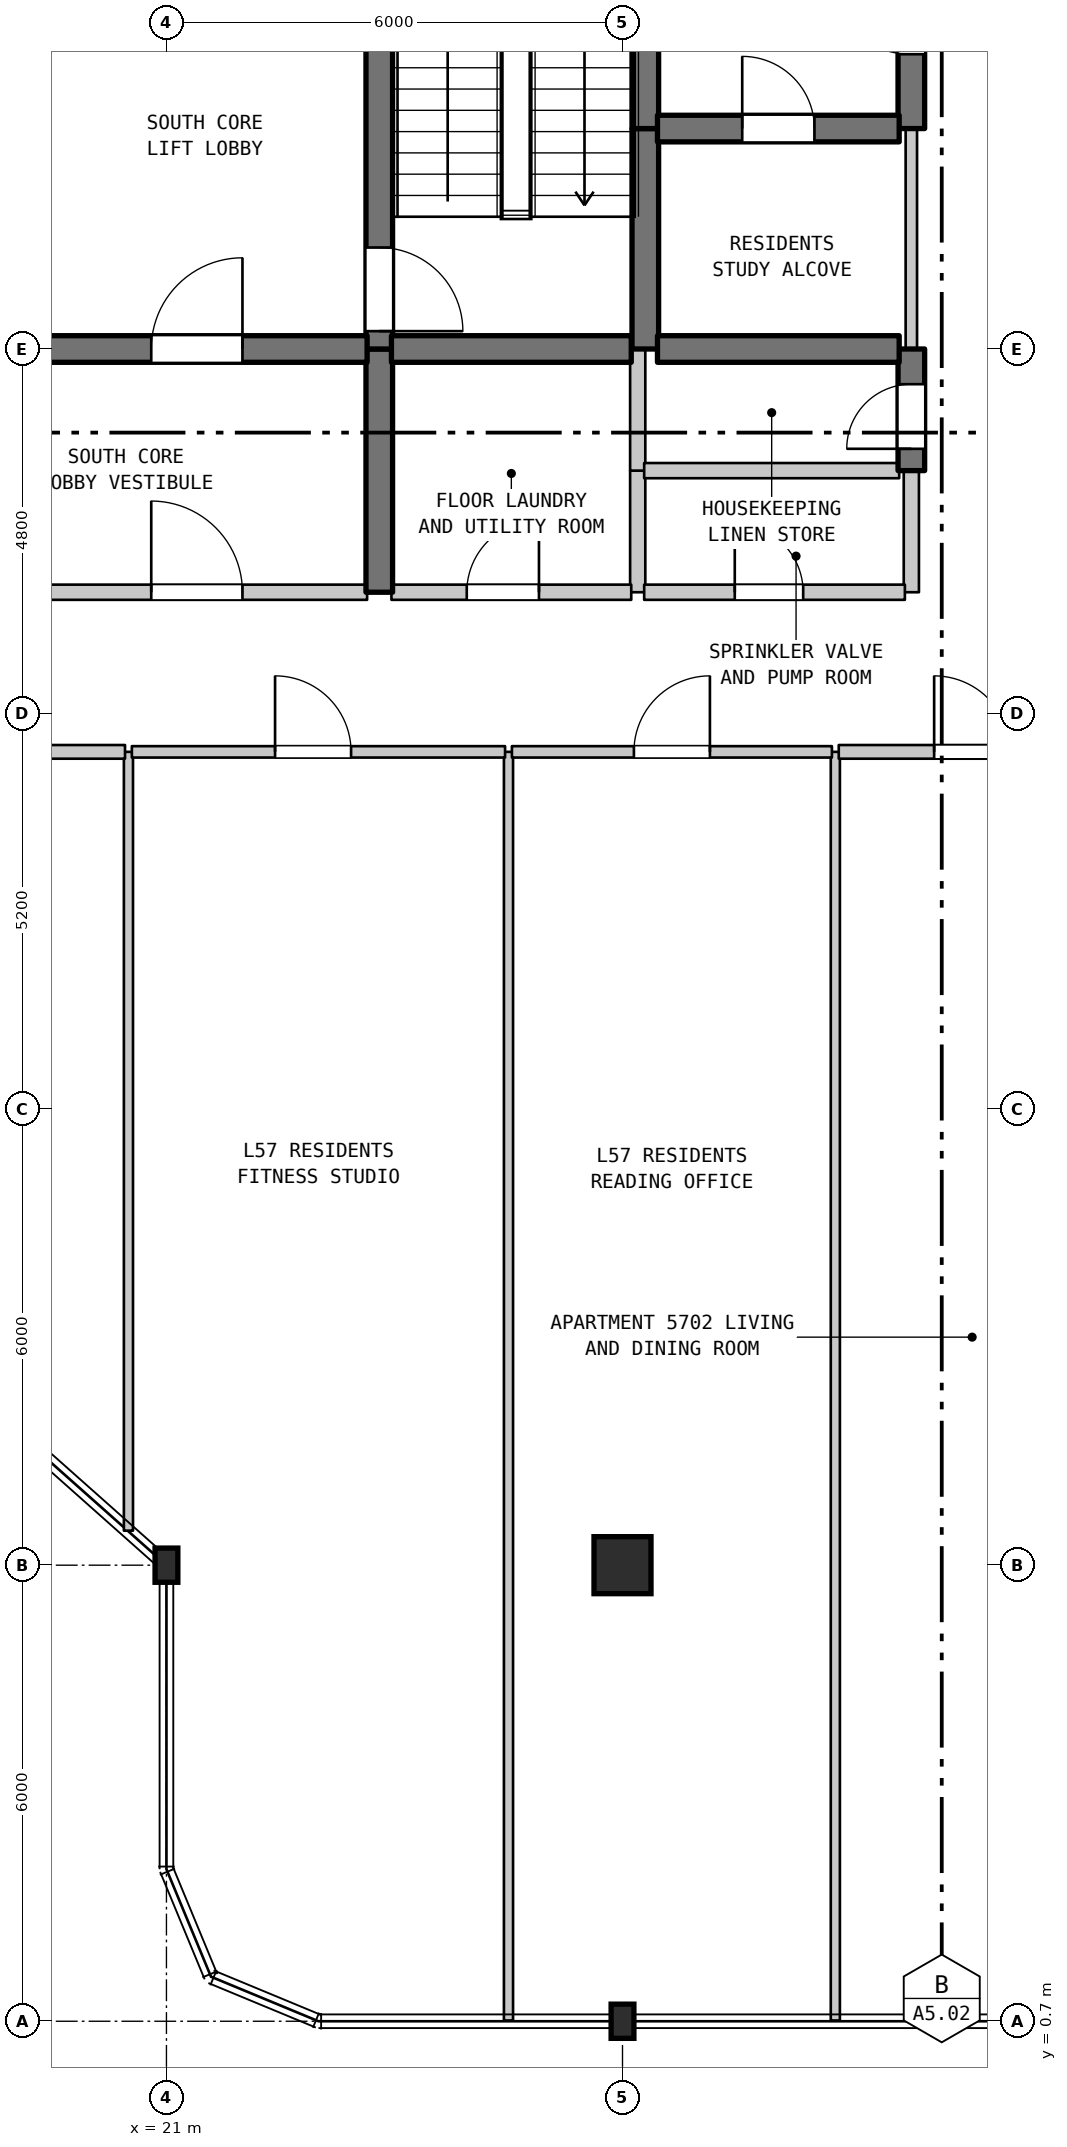
"""IFC4 building model, lengths in metres.
Left out: names, types, materials, properties, quantities, classifications, styles, units other than length and angle.
Written with IfcOpenShell. Run it as: python <this file> out.ifc"""

import sys

from ifc_helpers import new_model, si_unit, direction, frame, frame_2d, origin, origin_2d, place, context, subcontext, project, spatial, rectangle, i_section, extrude, element, fill, save


model = new_model("IFC4")
c1 = context("Model", 3, precision=1e-05, world=origin(), true_north=direction((0.0, 1.0)))
c2 = subcontext(c1, "Body", "Model", "MODEL_VIEW")
j1 = project(units=[si_unit("LENGTHUNIT", "METRE"), si_unit("PLANEANGLEUNIT", "RADIAN")], contexts=[c1])
p1 = place(None, origin())
s1 = spatial("IfcSite", under=j1, at=p1, CompositionType="ELEMENT")
p2 = place(p1, origin())
s2 = spatial("IfcBuilding", under=s1, at=p2, CompositionType="ELEMENT")
p3 = place(p2, frame((0.0, 0.0, 230.2)))
s3 = spatial("IfcBuildingStorey", under=s2, at=p3, CompositionType="ELEMENT", Elevation=230.2)
for number, where, z_axis, x_axis in (
    (1, (21.0, 6.7, 0.0), (0.0, 0.0, 1.0), (1.0, 0.0, 0.0)),
    (2, (27.0, 0.7, 0.0), (0.0, 0.0, 1.0), (1.0, 0.0, 0.0)),
):
    element("IfcColumn", number, at=place(p3, frame(where, z_axis=z_axis, x_axis=x_axis)), inside=s3, PredefinedType="COLUMN", context=c2, shape_type="SweptSolid", body=[
        extrude(i_section(OverallWidth=0.3, OverallDepth=0.45, WebThickness=0.014, FlangeThickness=0.026, FilletRadius=0.027, at=origin_2d()), origin(), (0.0, 0.0, 1.0), 3.7),
    ])
p4 = place(p3, frame((27.0, 6.7, 0.0), z_axis=(0.0, 0.0, 1.0), x_axis=(1.0, 0.0, 0.0)))
e3 = element("IfcColumn", 3, at=p4, inside=s3, PredefinedType="COLUMN", context=c2, shape_type="SweptSolid", body=[
    extrude(rectangle(XDim=0.75, YDim=0.75, at=origin_2d()), origin(), (0.0, 0.0, 1.0), 3.7),
])
p5 = place(p3, frame((20.5, 7.154, 0.0), z_axis=(0.0, 0.0, 1.0), x_axis=(0.0, 1.0, 0.0)))
e4 = element("IfcWall", 4, at=p5, inside=s3, PredefinedType="PARTITIONING", context=c2, shape_type="SweptSolid", body=[
    extrude(rectangle(XDim=10.246, YDim=0.12, at=frame_2d((5.123, 0.0))), origin(), (0.0, 0.0, 1.0), 3.39),
])
p6 = place(p3, frame((23.8, 19.5, 0.0), z_axis=(0.0, 0.0, 1.0), x_axis=(0.0, 1.0, 0.0)))
e5 = element("IfcWall", 5, at=p6, inside=s3, PredefinedType="SHEAR", context=c2, shape_type="SweptSolid", body=[
    extrude(rectangle(XDim=3.2, YDim=0.35, at=frame_2d((1.6, 0.0))), origin(), (0.0, 0.0, 1.0), 3.39),
])
p7 = place(p3, frame((23.8, 22.7, 0.0), z_axis=(0.0, 0.0, 1.0), x_axis=(0.0, 1.0, 0.0)))
e6 = element("IfcWall", 6, at=p7, inside=s3, PredefinedType="SHEAR", context=c2, shape_type="SweptSolid", body=[
    extrude(rectangle(XDim=5.5, YDim=0.35, at=frame_2d((2.75, 0.0))), origin(), (0.0, 0.0, 1.0), 3.39),
])
p8 = place(p7, frame((0.235, 0.0, 0.0)))
e7 = element("IfcOpeningElement", 7, at=p8, cuts=e6, PredefinedType="OPENING", context=c2, shape_type="SweptSolid", body=[
    extrude(rectangle(XDim=1.1, YDim=2.15, at=frame_2d((0.55, 1.075))), frame((0.0, 0.185, 0.0), z_axis=(0.0, -1.0, 0.0), x_axis=(1.0, 0.0, 0.0)), (0.0, 0.0, 1.0), 0.37),
])
p9 = place(p3, frame((25.5, 0.71, 0.0), z_axis=(0.0, 0.0, 1.0), x_axis=(0.0, 1.0, 0.0)))
e8 = element("IfcWall", 8, at=p9, inside=s3, PredefinedType="PARTITIONING", context=c2, shape_type="SweptSolid", body=[
    extrude(rectangle(XDim=16.69, YDim=0.12, at=frame_2d((8.345, 0.0))), origin(), (0.0, 0.0, 1.0), 3.39),
])
p10 = place(p3, frame((27.2, 19.5, 0.0), z_axis=(0.0, 0.0, 1.0), x_axis=(0.0, 1.0, 0.0)))
e9 = element("IfcWall", 9, at=p10, inside=s3, PredefinedType="STANDARD", context=c2, shape_type="SweptSolid", body=[
    extrude(rectangle(XDim=1.6, YDim=0.2, at=frame_2d((0.8, 0.0))), origin(), (0.0, 0.0, 1.0), 3.39),
])
p11 = place(p3, frame((27.2, 21.1, 0.0), z_axis=(0.0, 0.0, 1.0), x_axis=(0.0, 1.0, 0.0)))
e10 = element("IfcWall", 10, at=p11, inside=s3, PredefinedType="STANDARD", context=c2, shape_type="SweptSolid", body=[
    extrude(rectangle(XDim=1.6, YDim=0.2, at=frame_2d((0.8, 0.0))), origin(), (0.0, 0.0, 1.0), 3.39),
])
p12 = place(p3, frame((27.3, 22.7, 0.0), z_axis=(0.0, 0.0, 1.0), x_axis=(0.0, 1.0, 0.0)))
e11 = element("IfcWall", 11, at=p12, inside=s3, PredefinedType="SHEAR", context=c2, shape_type="SweptSolid", body=[
    extrude(rectangle(XDim=2.9, YDim=0.35, at=frame_2d((1.45, 0.0))), origin(), (0.0, 0.0, 1.0), 3.39),
])
p13 = place(p3, frame((27.3, 25.6, 0.0), z_axis=(0.0, 0.0, 1.0), x_axis=(0.0, 1.0, 0.0)))
e12 = element("IfcWall", 12, at=p13, inside=s3, PredefinedType="SHEAR", context=c2, shape_type="SweptSolid", body=[
    extrude(rectangle(XDim=3.3, YDim=0.35, at=frame_2d((1.65, 0.0))), origin(), (0.0, 0.0, 1.0), 3.39),
])
p14 = place(p3, frame((29.8, 0.71, 0.0), z_axis=(0.0, 0.0, 1.0), x_axis=(0.0, 1.0, 0.0)))
e13 = element("IfcWall", 13, at=p14, inside=s3, PredefinedType="PARTITIONING", context=c2, shape_type="SweptSolid", body=[
    extrude(rectangle(XDim=16.69, YDim=0.12, at=frame_2d((8.345, 0.0))), origin(), (0.0, 0.0, 1.0), 3.39),
])
p15 = place(p3, frame((30.8, 19.5, 0.0), z_axis=(0.0, 0.0, 1.0), x_axis=(0.0, 1.0, 0.0)))
e14 = element("IfcWall", 14, at=p15, inside=s3, PredefinedType="STANDARD", context=c2, shape_type="SweptSolid", body=[
    extrude(rectangle(XDim=1.6, YDim=0.2, at=frame_2d((0.8, 0.0))), origin(), (0.0, 0.0, 1.0), 3.39),
])
p16 = place(p3, frame((30.8, 21.1, 0.0), z_axis=(0.0, 0.0, 1.0), x_axis=(0.0, 1.0, 0.0)))
e15 = element("IfcWall", 15, at=p16, inside=s3, PredefinedType="SHEAR", context=c2, shape_type="SweptSolid", body=[
    extrude(rectangle(XDim=1.6, YDim=0.35, at=frame_2d((0.8, 0.0))), origin(), (0.0, 0.0, 1.0), 3.39),
])
p17 = place(p16, frame((0.287, 0.0, 0.0)))
e16 = element("IfcOpeningElement", 16, at=p17, cuts=e15, PredefinedType="OPENING", context=c2, shape_type="SweptSolid", body=[
    extrude(rectangle(XDim=0.85, YDim=2.1, at=frame_2d((0.425, 1.05))), frame((0.0, 0.185, 0.0), z_axis=(0.0, -1.0, 0.0), x_axis=(1.0, 0.0, 0.0)), (0.0, 0.0, 1.0), 0.37),
])
p18 = place(p3, frame((30.8, 22.7, 0.0), z_axis=(0.0, 0.0, 1.0), x_axis=(0.0, 1.0, 0.0)))
e17 = element("IfcWall", 17, at=p18, inside=s3, PredefinedType="STANDARD", context=c2, shape_type="SweptSolid", body=[
    extrude(rectangle(XDim=2.9, YDim=0.15, at=frame_2d((1.45, 0.0))), origin(), (0.0, 0.0, 1.0), 3.39),
])
p19 = place(p3, frame((30.8, 25.6, 0.0), z_axis=(0.0, 0.0, 1.0), x_axis=(0.0, 1.0, 0.0)))
e18 = element("IfcWall", 18, at=p19, inside=s3, PredefinedType="SHEAR", context=c2, shape_type="SweptSolid", body=[
    extrude(rectangle(XDim=3.3, YDim=0.35, at=frame_2d((1.65, 0.0))), origin(), (0.0, 0.0, 1.0), 3.39),
])
p20 = place(p19, frame((0.978, 0.0, 0.0)))
e19 = element("IfcOpeningElement", 19, at=p20, cuts=e18, PredefinedType="OPENING", context=c2, shape_type="SweptSolid", body=[
    extrude(rectangle(XDim=1.2, YDim=2.2, at=frame_2d((0.6, 1.1))), frame((0.0, 0.185, 0.0), z_axis=(0.0, -1.0, 0.0), x_axis=(1.0, 0.0, 0.0)), (0.0, 0.0, 1.0), 0.37),
])
p21 = place(p3, frame((18.595, 17.4, 0.0), z_axis=(0.0, 0.0, 1.0), x_axis=(1.0, 0.0, 0.0)))
e20 = element("IfcWall", 20, at=p21, inside=s3, PredefinedType="STANDARD", context=c2, shape_type="SweptSolid", body=[
    extrude(rectangle(XDim=1.86, YDim=0.18, at=frame_2d((0.93, 0.0))), origin(), (0.0, 0.0, 1.0), 3.39),
])
p22 = place(p3, frame((20.545, 17.4, 0.0), z_axis=(0.0, 0.0, 1.0), x_axis=(1.0, 0.0, 0.0)))
e21 = element("IfcWall", 21, at=p22, inside=s3, PredefinedType="STANDARD", context=c2, shape_type="SweptSolid", body=[
    extrude(rectangle(XDim=4.91, YDim=0.15, at=frame_2d((2.455, 0.0))), origin(), (0.0, 0.0, 1.0), 3.39),
])
p23 = place(p22, frame((1.884, 0.0, 0.0)))
e22 = element("IfcOpeningElement", 22, at=p23, cuts=e21, PredefinedType="OPENING", context=c2, shape_type="SweptSolid", body=[
    extrude(rectangle(XDim=1.0, YDim=2.15, at=frame_2d((0.5, 1.075))), frame((0.0, 0.085, 0.0), z_axis=(0.0, -1.0, 0.0), x_axis=(1.0, 0.0, 0.0)), (0.0, 0.0, 1.0), 0.17),
])
p24 = place(p3, frame((25.545, 17.4, 0.0), z_axis=(0.0, 0.0, 1.0), x_axis=(1.0, 0.0, 0.0)))
e23 = element("IfcWall", 23, at=p24, inside=s3, PredefinedType="STANDARD", context=c2, shape_type="SweptSolid", body=[
    extrude(rectangle(XDim=4.21, YDim=0.15, at=frame_2d((2.105, 0.0))), origin(), (0.0, 0.0, 1.0), 3.39),
])
p25 = place(p24, frame((1.605, 0.0, 0.0)))
e24 = element("IfcOpeningElement", 24, at=p25, cuts=e23, PredefinedType="OPENING", context=c2, shape_type="SweptSolid", body=[
    extrude(rectangle(XDim=1.0, YDim=2.15, at=frame_2d((0.5, 1.075))), frame((0.0, 0.085, 0.0), z_axis=(0.0, -1.0, 0.0), x_axis=(1.0, 0.0, 0.0)), (0.0, 0.0, 1.0), 0.17),
])
p26 = place(p3, frame((29.845, 17.4, 0.0), z_axis=(0.0, 0.0, 1.0), x_axis=(1.0, 0.0, 0.0)))
e25 = element("IfcWall", 25, at=p26, inside=s3, PredefinedType="STANDARD", context=c2, shape_type="SweptSolid", body=[
    extrude(rectangle(XDim=3.51, YDim=0.18, at=frame_2d((1.755, 0.0))), origin(), (0.0, 0.0, 1.0), 3.39),
])
p27 = place(p26, frame((1.255, 0.0, 0.0)))
e26 = element("IfcOpeningElement", 26, at=p27, cuts=e25, PredefinedType="OPENING", context=c2, shape_type="SweptSolid", body=[
    extrude(rectangle(XDim=1.0, YDim=2.15, at=frame_2d((0.5, 1.075))), frame((0.0, 0.1, 0.0), z_axis=(0.0, -1.0, 0.0), x_axis=(1.0, 0.0, 0.0)), (0.0, 0.0, 1.0), 0.2),
])
p28 = place(p3, frame((19.16, 19.5, 0.0), z_axis=(0.0, 0.0, 1.0), x_axis=(1.0, 0.0, 0.0)))
e27 = element("IfcWall", 27, at=p28, inside=s3, PredefinedType="STANDARD", context=c2, shape_type="SweptSolid", body=[
    extrude(rectangle(XDim=4.48, YDim=0.2, at=frame_2d((2.24, 0.0))), origin(), (0.0, 0.0, 1.0), 3.39),
])
p29 = place(p28, frame((1.64, 0.0, 0.0)))
e28 = element("IfcOpeningElement", 28, at=p29, cuts=e27, PredefinedType="OPENING", context=c2, shape_type="SweptSolid", body=[
    extrude(rectangle(XDim=1.2, YDim=2.2, at=frame_2d((0.6, 1.1))), frame((0.0, 0.11, 0.0), z_axis=(0.0, -1.0, 0.0), x_axis=(1.0, 0.0, 0.0)), (0.0, 0.0, 1.0), 0.22),
])
p30 = place(p3, frame((23.96, 19.5, 0.0), z_axis=(0.0, 0.0, 1.0), x_axis=(1.0, 0.0, 0.0)))
e29 = element("IfcWall", 29, at=p30, inside=s3, PredefinedType="STANDARD", context=c2, shape_type="SweptSolid", body=[
    extrude(rectangle(XDim=3.155, YDim=0.2, at=frame_2d((1.578, 0.0))), origin(), (0.0, 0.0, 1.0), 3.39),
])
p31 = place(p30, frame((0.991, 0.0, 0.0)))
e30 = element("IfcOpeningElement", 30, at=p31, cuts=e29, PredefinedType="OPENING", context=c2, shape_type="SweptSolid", body=[
    extrude(rectangle(XDim=0.95, YDim=2.15, at=frame_2d((0.475, 1.075))), frame((0.0, 0.11, 0.0), z_axis=(0.0, -1.0, 0.0), x_axis=(1.0, 0.0, 0.0)), (0.0, 0.0, 1.0), 0.22),
])
p32 = place(p3, frame((27.285, 19.5, 0.0), z_axis=(0.0, 0.0, 1.0), x_axis=(1.0, 0.0, 0.0)))
e31 = element("IfcWall", 31, at=p32, inside=s3, PredefinedType="STANDARD", context=c2, shape_type="SweptSolid", body=[
    extrude(rectangle(XDim=3.43, YDim=0.2, at=frame_2d((1.715, 0.0))), origin(), (0.0, 0.0, 1.0), 3.39),
])
p33 = place(p32, frame((1.192, 0.0, 0.0)))
e32 = element("IfcOpeningElement", 32, at=p33, cuts=e31, PredefinedType="OPENING", context=c2, shape_type="SweptSolid", body=[
    extrude(rectangle(XDim=0.9, YDim=2.15, at=frame_2d((0.45, 1.075))), frame((0.0, 0.11, 0.0), z_axis=(0.0, -1.0, 0.0), x_axis=(1.0, 0.0, 0.0)), (0.0, 0.0, 1.0), 0.22),
])
p34 = place(p3, frame((27.285, 21.1, 0.0), z_axis=(0.0, 0.0, 1.0), x_axis=(1.0, 0.0, 0.0)))
e33 = element("IfcWall", 33, at=p34, inside=s3, PredefinedType="STANDARD", context=c2, shape_type="SweptSolid", body=[
    extrude(rectangle(XDim=3.355, YDim=0.2, at=frame_2d((1.677, 0.0))), origin(), (0.0, 0.0, 1.0), 3.39),
])
p35 = place(p3, frame((19.16, 22.7, 0.0), z_axis=(0.0, 0.0, 1.0), x_axis=(1.0, 0.0, 0.0)))
e34 = element("IfcWall", 34, at=p35, inside=s3, PredefinedType="SHEAR", context=c2, shape_type="SweptSolid", body=[
    extrude(rectangle(XDim=4.48, YDim=0.35, at=frame_2d((2.24, 0.0))), origin(), (0.0, 0.0, 1.0), 3.39),
])
p36 = place(p35, frame((1.64, 0.0, 0.0)))
e35 = element("IfcOpeningElement", 35, at=p36, cuts=e34, PredefinedType="OPENING", context=c2, shape_type="SweptSolid", body=[
    extrude(rectangle(XDim=1.2, YDim=2.2, at=frame_2d((0.6, 1.1))), frame((0.0, 0.185, 0.0), z_axis=(0.0, -1.0, 0.0), x_axis=(1.0, 0.0, 0.0)), (0.0, 0.0, 1.0), 0.37),
])
p37 = place(p3, frame((23.96, 22.7, 0.0), z_axis=(0.0, 0.0, 1.0), x_axis=(1.0, 0.0, 0.0)))
e36 = element("IfcWall", 36, at=p37, inside=s3, PredefinedType="SHEAR", context=c2, shape_type="SweptSolid", body=[
    extrude(rectangle(XDim=3.155, YDim=0.35, at=frame_2d((1.578, 0.0))), origin(), (0.0, 0.0, 1.0), 3.39),
])
p38 = place(p3, frame((27.46, 22.7, 0.0), z_axis=(0.0, 0.0, 1.0), x_axis=(1.0, 0.0, 0.0)))
e37 = element("IfcWall", 37, at=p38, inside=s3, PredefinedType="SHEAR", context=c2, shape_type="SweptSolid", body=[
    extrude(rectangle(XDim=3.18, YDim=0.35, at=frame_2d((1.59, 0.0))), origin(), (0.0, 0.0, 1.0), 3.39),
])
p39 = place(p3, frame((27.46, 25.6, 0.0), z_axis=(0.0, 0.0, 1.0), x_axis=(1.0, 0.0, 0.0)))
e38 = element("IfcWall", 38, at=p39, inside=s3, PredefinedType="SHEAR", context=c2, shape_type="SweptSolid", body=[
    extrude(rectangle(XDim=3.18, YDim=0.35, at=frame_2d((1.59, 0.0))), origin(), (0.0, 0.0, 1.0), 3.39),
])
p40 = place(p39, frame((1.115, 0.0, 0.0)))
e39 = element("IfcOpeningElement", 39, at=p40, cuts=e38, PredefinedType="OPENING", context=c2, shape_type="SweptSolid", body=[
    extrude(rectangle(XDim=0.95, YDim=2.15, at=frame_2d((0.475, 1.075))), frame((0.0, 0.185, 0.0), z_axis=(0.0, -1.0, 0.0), x_axis=(1.0, 0.0, 0.0)), (0.0, 0.0, 1.0), 0.37),
])
p41 = place(p8, frame((1.1, 0.0, 0.0), z_axis=(0.0, 0.0, 1.0), x_axis=(-1.0, 0.0, 0.0)))
e40 = element("IfcDoor", 40, at=p41, inside=s3, OperationType="SINGLE_SWING_LEFT", PredefinedType="DOOR", context=c2, shape_type="SweptSolid", body=[
    extrude(rectangle(XDim=1.1, YDim=2.15, at=frame_2d((0.55, 1.075))), frame((0.0, 0.025, 0.0), z_axis=(0.0, -1.0, 0.0), x_axis=(1.0, 0.0, 0.0)), (0.0, 0.0, 1.0), 0.05),
])
fill(e7, e40)
p42 = place(p17, origin())
e41 = element("IfcDoor", 41, at=p42, inside=s3, OperationType="SINGLE_SWING_LEFT", PredefinedType="DOOR", context=c2, shape_type="SweptSolid", body=[
    extrude(rectangle(XDim=0.85, YDim=2.1, at=frame_2d((0.425, 1.05))), frame((0.0, 0.025, 0.0), z_axis=(0.0, -1.0, 0.0), x_axis=(1.0, 0.0, 0.0)), (0.0, 0.0, 1.0), 0.05),
])
fill(e16, e41)
p43 = place(p20, origin())
e42 = element("IfcDoor", 42, at=p43, inside=s3, OperationType="SINGLE_SWING_RIGHT", PredefinedType="DOOR", context=c2, shape_type="SweptSolid", body=[
    extrude(rectangle(XDim=1.2, YDim=2.2, at=frame_2d((0.6, 1.1))), frame((0.0, 0.025, 0.0), z_axis=(0.0, -1.0, 0.0), x_axis=(1.0, 0.0, 0.0)), (0.0, 0.0, 1.0), 0.05),
])
fill(e19, e42)
p44 = place(p23, origin())
e43 = element("IfcDoor", 43, at=p44, inside=s3, OperationType="SINGLE_SWING_LEFT", PredefinedType="DOOR", context=c2, shape_type="SweptSolid", body=[
    extrude(rectangle(XDim=1.0, YDim=2.15, at=frame_2d((0.5, 1.075))), frame((0.0, 0.025, 0.0), z_axis=(0.0, -1.0, 0.0), x_axis=(1.0, 0.0, 0.0)), (0.0, 0.0, 1.0), 0.05),
])
fill(e22, e43)
p45 = place(p25, origin())
e44 = element("IfcDoor", 44, at=p45, inside=s3, OperationType="SINGLE_SWING_RIGHT", PredefinedType="DOOR", context=c2, shape_type="SweptSolid", body=[
    extrude(rectangle(XDim=1.0, YDim=2.15, at=frame_2d((0.5, 1.075))), frame((0.0, 0.025, 0.0), z_axis=(0.0, -1.0, 0.0), x_axis=(1.0, 0.0, 0.0)), (0.0, 0.0, 1.0), 0.05),
])
fill(e24, e44)
p46 = place(p27, origin())
e45 = element("IfcDoor", 45, at=p46, inside=s3, OperationType="SINGLE_SWING_LEFT", PredefinedType="DOOR", context=c2, shape_type="SweptSolid", body=[
    extrude(rectangle(XDim=1.0, YDim=2.15, at=frame_2d((0.5, 1.075))), frame((0.0, 0.025, 0.0), z_axis=(0.0, -1.0, 0.0), x_axis=(1.0, 0.0, 0.0)), (0.0, 0.0, 1.0), 0.05),
])
fill(e26, e45)
p47 = place(p29, origin())
e46 = element("IfcDoor", 46, at=p47, inside=s3, OperationType="SINGLE_SWING_LEFT", PredefinedType="DOOR", context=c2, shape_type="SweptSolid", body=[
    extrude(rectangle(XDim=1.2, YDim=2.2, at=frame_2d((0.6, 1.1))), frame((0.0, 0.025, 0.0), z_axis=(0.0, -1.0, 0.0), x_axis=(1.0, 0.0, 0.0)), (0.0, 0.0, 1.0), 0.05),
])
fill(e28, e46)
p48 = place(p31, origin())
e47 = element("IfcDoor", 47, at=p48, inside=s3, OperationType="SINGLE_SWING_RIGHT", PredefinedType="DOOR", context=c2, shape_type="SweptSolid", body=[
    extrude(rectangle(XDim=0.95, YDim=2.15, at=frame_2d((0.475, 1.075))), frame((0.0, 0.025, 0.0), z_axis=(0.0, -1.0, 0.0), x_axis=(1.0, 0.0, 0.0)), (0.0, 0.0, 1.0), 0.05),
])
fill(e30, e47)
p49 = place(p33, origin())
e48 = element("IfcDoor", 48, at=p49, inside=s3, OperationType="SINGLE_SWING_LEFT", PredefinedType="DOOR", context=c2, shape_type="SweptSolid", body=[
    extrude(rectangle(XDim=0.9, YDim=2.15, at=frame_2d((0.45, 1.075))), frame((0.0, 0.025, 0.0), z_axis=(0.0, -1.0, 0.0), x_axis=(1.0, 0.0, 0.0)), (0.0, 0.0, 1.0), 0.05),
])
fill(e32, e48)
p50 = place(p36, origin())
e49 = element("IfcDoor", 49, at=p50, inside=s3, OperationType="SINGLE_SWING_RIGHT", PredefinedType="DOOR", context=c2, shape_type="SweptSolid", body=[
    extrude(rectangle(XDim=1.2, YDim=2.2, at=frame_2d((0.6, 1.1))), frame((0.0, 0.025, 0.0), z_axis=(0.0, -1.0, 0.0), x_axis=(1.0, 0.0, 0.0)), (0.0, 0.0, 1.0), 0.05),
])
fill(e35, e49)
p51 = place(p40, origin())
e50 = element("IfcDoor", 50, at=p51, inside=s3, OperationType="SINGLE_SWING_LEFT", PredefinedType="DOOR", context=c2, shape_type="SweptSolid", body=[
    extrude(rectangle(XDim=0.95, YDim=2.15, at=frame_2d((0.475, 1.075))), frame((0.0, 0.025, 0.0), z_axis=(0.0, -1.0, 0.0), x_axis=(1.0, 0.0, 0.0)), (0.0, 0.0, 1.0), 0.05),
])
fill(e39, e50)
save(model, sys.argv[1])
